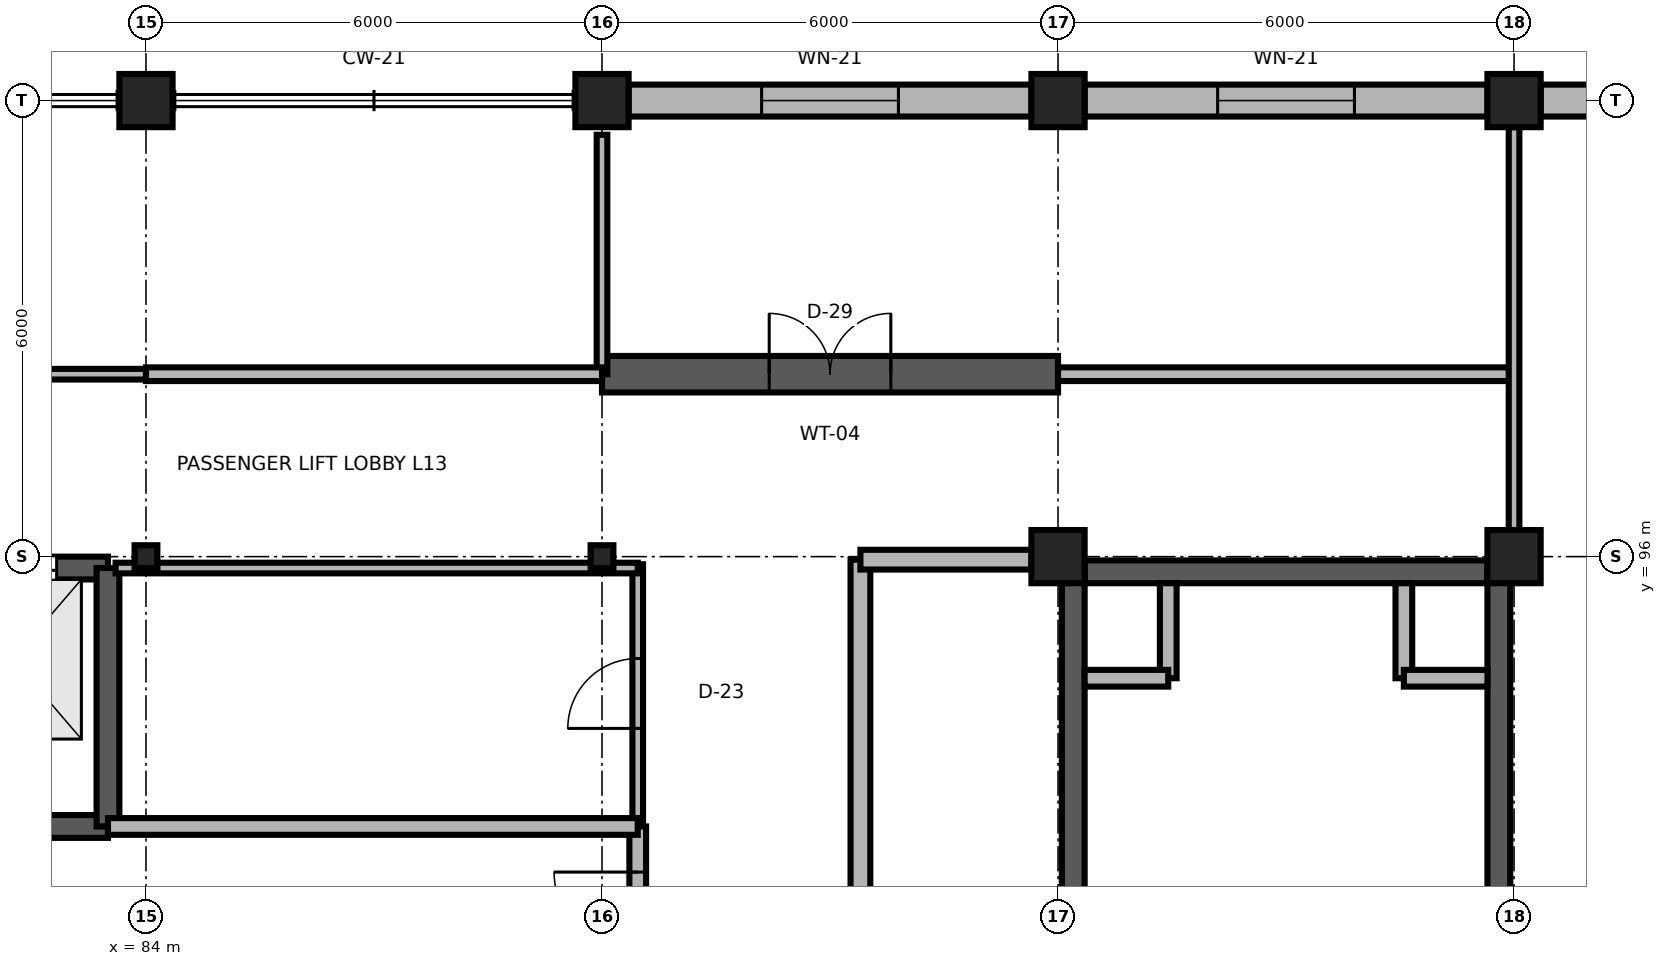
"""IFC4 building model, lengths in metres.
Left out: names, types, materials, properties, quantities, classifications, styles, units other than length and angle.
Written with IfcOpenShell. Run it as: python <this file> out.ifc"""

import sys

from ifc_helpers import new_model, si_unit, direction, frame, frame_2d, origin, origin_2d, place, context, subcontext, project, spatial, rectangle, i_section, extrude, element, fill, save


model = new_model("IFC4")
c1 = context("Model", 3, precision=1e-05, world=origin(), true_north=direction((0.0, 1.0)))
c2 = subcontext(c1, "Body", "Model", "MODEL_VIEW")
j1 = project(units=[si_unit("LENGTHUNIT", "METRE"), si_unit("PLANEANGLEUNIT", "RADIAN")], contexts=[c1])
p1 = place(None, origin())
s1 = spatial("IfcSite", under=j1, at=p1, CompositionType="ELEMENT")
p2 = place(p1, origin())
s2 = spatial("IfcBuilding", under=s1, at=p2, CompositionType="ELEMENT")
p3 = place(p2, frame((0.0, 0.0, 52.2)))
s3 = spatial("IfcBuildingStorey", under=s2, at=p3, CompositionType="ELEMENT", Elevation=52.2)
for number, where, z_axis, x_axis in (
    (1, (84.0, 96.0, 0.0), (0.0, 0.0, 1.0), (1.0, 0.0, 0.0)),
    (2, (90.0, 96.0, 0.0), (0.0, 0.0, 1.0), (1.0, 0.0, 0.0)),
):
    element("IfcColumn", number, at=place(p3, frame(where, z_axis=z_axis, x_axis=x_axis)), inside=s3, PredefinedType="COLUMN", context=c2, shape_type="SweptSolid", body=[
        extrude(i_section(OverallWidth=0.3, OverallDepth=0.3, WebThickness=0.01, FlangeThickness=0.015, FilletRadius=0.018, at=origin_2d()), origin(), (0.0, 0.0, 1.0), 3.9),
    ])
for number, where, z_axis, x_axis in (
    (3, (96.0, 96.0, 0.0), (0.0, 0.0, 1.0), (1.0, 0.0, 0.0)),
    (4, (102.0, 96.0, 0.0), (0.0, 0.0, 1.0), (1.0, 0.0, 0.0)),
    (5, (84.0, 102.0, 0.0), (0.0, 0.0, 1.0), (1.0, 0.0, 0.0)),
    (6, (90.0, 102.0, 0.0), (0.0, 0.0, 1.0), (1.0, 0.0, 0.0)),
    (7, (96.0, 102.0, 0.0), (0.0, 0.0, 1.0), (1.0, 0.0, 0.0)),
    (8, (102.0, 102.0, 0.0), (0.0, 0.0, 1.0), (1.0, 0.0, 0.0)),
):
    element("IfcColumn", number, at=place(p3, frame(where, z_axis=z_axis, x_axis=x_axis)), inside=s3, PredefinedType="COLUMN", context=c2, shape_type="SweptSolid", body=[
        extrude(rectangle(XDim=0.7, YDim=0.7, at=origin_2d()), origin(), (0.0, 0.0, 1.0), 3.9),
    ])
p4 = place(p3, frame((90.35, 102.0, 0.0), z_axis=(0.0, 0.0, 1.0), x_axis=(1.0, 0.0, 0.0)))
e9 = element("IfcWall", 9, at=p4, inside=s3, PredefinedType="SOLIDWALL", context=c2, shape_type="SweptSolid", body=[
    extrude(rectangle(XDim=5.3, YDim=0.42, at=frame_2d((2.65, 0.0))), origin(), (0.0, 0.0, 1.0), 3.32),
])
p5 = place(p4, frame((1.75, 0.0, 0.85)))
e10 = element("IfcOpeningElement", 10, at=p5, cuts=e9, PredefinedType="OPENING", context=c2, shape_type="SweptSolid", body=[
    extrude(rectangle(XDim=1.8, YDim=1.95, at=frame_2d((0.9, 0.975))), frame((0.0, 0.225, 0.0), z_axis=(0.0, -1.0, 0.0), x_axis=(1.0, 0.0, 0.0)), (0.0, 0.0, 1.0), 0.45),
])
p6 = place(p3, frame((96.35, 102.0, 0.0), z_axis=(0.0, 0.0, 1.0), x_axis=(1.0, 0.0, 0.0)))
e11 = element("IfcWall", 11, at=p6, inside=s3, PredefinedType="SOLIDWALL", context=c2, shape_type="SweptSolid", body=[
    extrude(rectangle(XDim=5.3, YDim=0.42, at=frame_2d((2.65, 0.0))), origin(), (0.0, 0.0, 1.0), 3.32),
])
p7 = place(p6, frame((1.75, 0.0, 0.85)))
e12 = element("IfcOpeningElement", 12, at=p7, cuts=e11, PredefinedType="OPENING", context=c2, shape_type="SweptSolid", body=[
    extrude(rectangle(XDim=1.8, YDim=1.95, at=frame_2d((0.9, 0.975))), frame((0.0, 0.225, 0.0), z_axis=(0.0, -1.0, 0.0), x_axis=(1.0, 0.0, 0.0)), (0.0, 0.0, 1.0), 0.45),
])
p8 = place(p3, frame((102.35, 102.0, 0.0), z_axis=(0.0, 0.0, 1.0), x_axis=(1.0, 0.0, 0.0)))
e13 = element("IfcWall", 13, at=p8, inside=s3, PredefinedType="SOLIDWALL", context=c2, shape_type="SweptSolid", body=[
    extrude(rectangle(XDim=5.3, YDim=0.42, at=frame_2d((2.65, 0.0))), origin(), (0.0, 0.0, 1.0), 3.32),
])
p9 = place(p8, frame((1.75, 0.0, 0.85)))
e14 = element("IfcOpeningElement", 14, at=p9, cuts=e13, PredefinedType="OPENING", context=c2, shape_type="SweptSolid", body=[
    extrude(rectangle(XDim=1.8, YDim=1.95, at=frame_2d((0.9, 0.975))), frame((0.0, 0.225, 0.0), z_axis=(0.0, -1.0, 0.0), x_axis=(1.0, 0.0, 0.0)), (0.0, 0.0, 1.0), 0.45),
])
p10 = place(p3, frame((96.35, 95.8, 0.0), z_axis=(0.0, 0.0, 1.0), x_axis=(1.0, 0.0, 0.0)))
e15 = element("IfcWall", 15, at=p10, inside=s3, PredefinedType="SHEAR", context=c2, shape_type="SweptSolid", body=[
    extrude(rectangle(XDim=5.3, YDim=0.3, at=frame_2d((2.65, 0.0))), origin(), (0.0, 0.0, 1.0), 3.74),
])
for number, where, z_axis, x_axis in (
    (16, (96.2, 84.0, 0.0), (0.0, 0.0, 1.0), (0.0, 1.0, 0.0)),
    (17, (101.8, 84.0, 0.0), (0.0, 0.0, 1.0), (0.0, 1.0, 0.0)),
):
    element("IfcWall", number, at=place(p3, frame(where, z_axis=z_axis, x_axis=x_axis)), inside=s3, PredefinedType="SHEAR", context=c2, shape_type="SweptSolid", body=[
        extrude(rectangle(XDim=11.8, YDim=0.3, at=frame_2d((5.9, 0.0))), origin(), (0.0, 0.0, 1.0), 3.74),
    ])
p11 = place(p3, frame((97.45, 94.4, 0.0), z_axis=(0.0, 0.0, 1.0), x_axis=(0.0, 1.0, 0.0)))
e18 = element("IfcWall", 18, at=p11, inside=s3, PredefinedType="PARTITIONING", context=c2, shape_type="SweptSolid", body=[
    extrude(rectangle(XDim=1.25, YDim=0.22, at=frame_2d((0.625, 0.0))), origin(), (0.0, 0.0, 1.0), 3.74),
])
p12 = place(p3, frame((96.35, 94.4, 0.0), z_axis=(0.0, 0.0, 1.0), x_axis=(1.0, 0.0, 0.0)))
e19 = element("IfcWall", 19, at=p12, inside=s3, PredefinedType="PARTITIONING", context=c2, shape_type="SweptSolid", body=[
    extrude(rectangle(XDim=1.1, YDim=0.22, at=frame_2d((0.55, 0.0))), origin(), (0.0, 0.0, 1.0), 3.74),
])
p13 = place(p3, frame((100.55, 94.4, 0.0), z_axis=(0.0, 0.0, 1.0), x_axis=(0.0, 1.0, 0.0)))
e20 = element("IfcWall", 20, at=p13, inside=s3, PredefinedType="PARTITIONING", context=c2, shape_type="SweptSolid", body=[
    extrude(rectangle(XDim=1.25, YDim=0.22, at=frame_2d((0.625, 0.0))), origin(), (0.0, 0.0, 1.0), 3.74),
])
p14 = place(p3, frame((100.55, 94.4, 0.0), z_axis=(0.0, 0.0, 1.0), x_axis=(1.0, 0.0, 0.0)))
e21 = element("IfcWall", 21, at=p14, inside=s3, PredefinedType="PARTITIONING", context=c2, shape_type="SweptSolid", body=[
    extrude(rectangle(XDim=1.1, YDim=0.22, at=frame_2d((0.55, 0.0))), origin(), (0.0, 0.0, 1.0), 3.74),
])
p15 = place(p3, frame((81.0, 95.85, 0.0), z_axis=(0.0, 0.0, 1.0), x_axis=(1.0, 0.0, 0.0)))
e22 = element("IfcWall", 22, at=p15, inside=s3, PredefinedType="SHEAR", context=c2, shape_type="SweptSolid", body=[
    extrude(rectangle(XDim=2.5, YDim=0.3, at=frame_2d((1.25, 0.0))), origin(), (0.0, 0.0, 1.0), 3.74),
])
p16 = place(p15, frame((0.675, 0.0, 0.0)))
e23 = element("IfcOpeningElement", 23, at=p16, cuts=e22, PredefinedType="OPENING", context=c2, shape_type="SweptSolid", body=[
    extrude(rectangle(XDim=1.15, YDim=2.15, at=frame_2d((0.575, 1.075))), frame((0.0, 0.165, 0.0), z_axis=(0.0, -1.0, 0.0), x_axis=(1.0, 0.0, 0.0)), (0.0, 0.0, 1.0), 0.33),
])
p17 = place(p3, frame((81.0, 92.45, 0.0), z_axis=(0.0, 0.0, 1.0), x_axis=(1.0, 0.0, 0.0)))
e24 = element("IfcWall", 24, at=p17, inside=s3, PredefinedType="SHEAR", context=c2, shape_type="SweptSolid", body=[
    extrude(rectangle(XDim=2.5, YDim=0.3, at=frame_2d((1.25, 0.0))), origin(), (0.0, 0.0, 1.0), 3.74),
])
p18 = place(p3, frame((83.5, 92.45, 0.0), z_axis=(0.0, 0.0, 1.0), x_axis=(0.0, 1.0, 0.0)))
e25 = element("IfcWall", 25, at=p18, inside=s3, PredefinedType="SHEAR", context=c2, shape_type="SweptSolid", body=[
    extrude(rectangle(XDim=3.4, YDim=0.3, at=frame_2d((1.7, 0.0))), origin(), (0.0, 0.0, 1.0), 3.74),
])
p19 = place(p3, frame((93.4, 84.0, 0.0), z_axis=(0.0, 0.0, 1.0), x_axis=(0.0, 1.0, 0.0)))
e26 = element("IfcWall", 26, at=p19, inside=s3, PredefinedType="PARTITIONING", context=c2, shape_type="SweptSolid", body=[
    extrude(rectangle(XDim=11.96, YDim=0.26, at=frame_2d((5.98, 0.0))), origin(), (0.0, 0.0, 1.0), 3.74),
])
p20 = place(p19, frame((3.425, 0.0, 0.0)))
e27 = element("IfcOpeningElement", 27, at=p20, cuts=e26, PredefinedType="OPENING", context=c2, shape_type="SweptSolid", body=[
    extrude(rectangle(XDim=1.15, YDim=2.2, at=frame_2d((0.575, 1.1))), frame((0.0, 0.145, 0.0), z_axis=(0.0, -1.0, 0.0), x_axis=(1.0, 0.0, 0.0)), (0.0, 0.0, 1.0), 0.29),
])
p21 = place(p3, frame((93.4, 95.96, 0.0), z_axis=(0.0, 0.0, 1.0), x_axis=(1.0, 0.0, 0.0)))
e28 = element("IfcWall", 28, at=p21, inside=s3, PredefinedType="PARTITIONING", context=c2, shape_type="SweptSolid", body=[
    extrude(rectangle(XDim=2.25, YDim=0.26, at=frame_2d((1.125, 0.0))), origin(), (0.0, 0.0, 1.0), 3.449),
])
p22 = place(p3, frame((90.47, 89.2, 0.0), z_axis=(0.0, 0.0, 1.0), x_axis=(0.0, 1.0, 0.0)))
e29 = element("IfcWall", 29, at=p22, inside=s3, PredefinedType="PARTITIONING", context=c2, shape_type="SweptSolid", body=[
    extrude(rectangle(XDim=3.25, YDim=0.22, at=frame_2d((1.625, 0.0))), origin(), (0.0, 0.0, 1.0), 3.74),
])
p23 = place(p22, frame((1.55, 0.0, 0.0)))
e30 = element("IfcOpeningElement", 30, at=p23, cuts=e29, PredefinedType="OPENING", context=c2, shape_type="SweptSolid", body=[
    extrude(rectangle(XDim=1.1, YDim=2.15, at=frame_2d((0.55, 1.075))), frame((0.0, 0.125, 0.0), z_axis=(0.0, -1.0, 0.0), x_axis=(1.0, 0.0, 0.0)), (0.0, 0.0, 1.0), 0.25),
])
p24 = place(p3, frame((72.0, 98.4, 0.0), z_axis=(0.0, 0.0, 1.0), x_axis=(1.0, 0.0, 0.0)))
e31 = element("IfcWall", 31, at=p24, inside=s3, PredefinedType="PARTITIONING", context=c2, shape_type="SweptSolid", body=[
    extrude(rectangle(XDim=12.0, YDim=0.14, at=frame_2d((6.0, 0.0))), origin(), (0.0, 0.0, 1.0), 3.74),
])
p25 = place(p24, frame((5.175, 0.0, 0.0)))
e32 = element("IfcOpeningElement", 32, at=p25, cuts=e31, PredefinedType="OPENING", context=c2, shape_type="SweptSolid", body=[
    extrude(rectangle(XDim=1.65, YDim=2.35, at=frame_2d((0.825, 1.175))), frame((0.0, 0.085, 0.0), z_axis=(0.0, -1.0, 0.0), x_axis=(1.0, 0.0, 0.0)), (0.0, 0.0, 1.0), 0.17),
])
p26 = place(p3, frame((90.0, 98.4, 0.0), z_axis=(0.0, 0.0, 1.0), x_axis=(1.0, 0.0, 0.0)))
e33 = element("IfcWall", 33, at=p26, inside=s3, PredefinedType="SHEAR", context=c2, shape_type="SweptSolid", body=[
    extrude(rectangle(XDim=6.0, YDim=0.48, at=frame_2d((3.0, 0.0))), origin(), (0.0, 0.0, 1.0), 3.74),
])
p27 = place(p26, frame((2.2, 0.0, 0.0)))
e34 = element("IfcOpeningElement", 34, at=p27, cuts=e33, PredefinedType="OPENING", context=c2, shape_type="SweptSolid", body=[
    extrude(rectangle(XDim=1.6, YDim=2.25, at=frame_2d((0.8, 1.125))), frame((0.0, 0.255, 0.0), z_axis=(0.0, -1.0, 0.0), x_axis=(1.0, 0.0, 0.0)), (0.0, 0.0, 1.0), 0.51),
])
p28 = place(p3, frame((90.47, 92.5, 0.0), z_axis=(0.0, 0.0, 1.0), x_axis=(0.0, 1.0, 0.0)))
e35 = element("IfcWall", 35, at=p28, inside=s3, PredefinedType="PARTITIONING", context=c2, shape_type="SweptSolid", body=[
    extrude(rectangle(XDim=3.4, YDim=0.14, at=frame_2d((1.7, 0.0))), origin(), (0.0, 0.0, 1.0), 3.74),
])
p29 = place(p28, frame((1.24, 0.0, 0.0)))
e36 = element("IfcOpeningElement", 36, at=p29, cuts=e35, PredefinedType="OPENING", context=c2, shape_type="SweptSolid", body=[
    extrude(rectangle(XDim=0.92, YDim=2.15, at=frame_2d((0.46, 1.075))), frame((0.0, 0.085, 0.0), z_axis=(0.0, -1.0, 0.0), x_axis=(1.0, 0.0, 0.0)), (0.0, 0.0, 1.0), 0.17),
])
p30 = place(p3, frame((90.0, 98.4, 0.0), z_axis=(0.0, 0.0, 1.0), x_axis=(0.0, 1.0, 0.0)))
e37 = element("IfcWall", 37, at=p30, inside=s3, PredefinedType="PARTITIONING", context=c2, shape_type="SweptSolid", body=[
    extrude(rectangle(XDim=3.15, YDim=0.14, at=frame_2d((1.575, 0.0))), origin(), (0.0, 0.0, 1.0), 3.449),
])
p31 = place(p3, frame((83.6, 95.85, 0.0), z_axis=(0.0, 0.0, 1.0), x_axis=(1.0, 0.0, 0.0)))
e38 = element("IfcWall", 38, at=p31, inside=s3, PredefinedType="PARTITIONING", context=c2, shape_type="SweptSolid", body=[
    extrude(rectangle(XDim=6.87, YDim=0.14, at=frame_2d((3.435, 0.0))), origin(), (0.0, 0.0, 1.0), 3.74),
])
p32 = place(p3, frame((83.5, 92.45, 0.0), z_axis=(0.0, 0.0, 1.0), x_axis=(1.0, 0.0, 0.0)))
e39 = element("IfcWall", 39, at=p32, inside=s3, PredefinedType="PARTITIONING", context=c2, shape_type="SweptSolid", body=[
    extrude(rectangle(XDim=6.97, YDim=0.22, at=frame_2d((3.485, 0.0))), origin(), (0.0, 0.0, 1.0), 3.74),
])
for number, where, z_axis, x_axis in (
    (40, (84.0, 98.4, 0.0), (0.0, 0.0, 1.0), (1.0, 0.0, 0.0)),
    (41, (96.0, 98.4, 0.0), (0.0, 0.0, 1.0), (1.0, 0.0, 0.0)),
):
    element("IfcWall", number, at=place(p3, frame(where, z_axis=z_axis, x_axis=x_axis)), inside=s3, PredefinedType="PARTITIONING", context=c2, shape_type="SweptSolid", body=[
        extrude(rectangle(XDim=6.0, YDim=0.18, at=frame_2d((3.0, 0.0))), origin(), (0.0, 0.0, 1.0), 3.74),
    ])
p33 = place(p3, frame((102.0, 96.35, 0.0), z_axis=(0.0, 0.0, 1.0), x_axis=(0.0, 1.0, 0.0)))
e42 = element("IfcWall", 42, at=p33, inside=s3, PredefinedType="PARTITIONING", context=c2, shape_type="SweptSolid", body=[
    extrude(rectangle(XDim=5.3, YDim=0.14, at=frame_2d((2.65, 0.0))), origin(), (0.0, 0.0, 1.0), 3.449),
])
p34 = place(p5, origin())
e43 = element("IfcWindow", 43, at=p34, inside=s3, PartitioningType="SINGLE_PANEL", PredefinedType="WINDOW", context=c2, shape_type="SweptSolid", body=[
    extrude(rectangle(XDim=1.8, YDim=1.95, at=frame_2d((0.9, 0.975))), frame((0.0, 0.03, 0.0), z_axis=(0.0, -1.0, 0.0), x_axis=(1.0, 0.0, 0.0)), (0.0, 0.0, 1.0), 0.06),
])
fill(e10, e43)
p35 = place(p7, origin())
e44 = element("IfcWindow", 44, at=p35, inside=s3, PartitioningType="SINGLE_PANEL", PredefinedType="WINDOW", context=c2, shape_type="SweptSolid", body=[
    extrude(rectangle(XDim=1.8, YDim=1.95, at=frame_2d((0.9, 0.975))), frame((0.0, 0.03, 0.0), z_axis=(0.0, -1.0, 0.0), x_axis=(1.0, 0.0, 0.0)), (0.0, 0.0, 1.0), 0.06),
])
fill(e12, e44)
p36 = place(p16, origin())
e45 = element("IfcDoor", 45, at=p36, inside=s3, OperationType="DOUBLE_DOOR_SLIDING", PredefinedType="DOOR", context=c2, shape_type="SweptSolid", body=[
    extrude(rectangle(XDim=1.15, YDim=2.15, at=frame_2d((0.575, 1.075))), frame((0.0, 0.025, 0.0), z_axis=(0.0, -1.0, 0.0), x_axis=(1.0, 0.0, 0.0)), (0.0, 0.0, 1.0), 0.05),
])
fill(e23, e45)
p37 = place(p23, origin())
e46 = element("IfcDoor", 46, at=p37, inside=s3, OperationType="SINGLE_SWING_RIGHT", PredefinedType="DOOR", context=c2, shape_type="SweptSolid", body=[
    extrude(rectangle(XDim=1.1, YDim=2.15, at=frame_2d((0.55, 1.075))), frame((0.0, 0.025, 0.0), z_axis=(0.0, -1.0, 0.0), x_axis=(1.0, 0.0, 0.0)), (0.0, 0.0, 1.0), 0.05),
])
fill(e30, e46)
p38 = place(p27, origin())
e47 = element("IfcDoor", 47, at=p38, inside=s3, OperationType="DOUBLE_DOOR_SINGLE_SWING", PredefinedType="DOOR", context=c2, shape_type="SweptSolid", body=[
    extrude(rectangle(XDim=1.6, YDim=2.25, at=frame_2d((0.8, 1.125))), frame((0.0, 0.025, 0.0), z_axis=(0.0, -1.0, 0.0), x_axis=(1.0, 0.0, 0.0)), (0.0, 0.0, 1.0), 0.05),
])
fill(e34, e47)
p39 = place(p29, origin())
e48 = element("IfcDoor", 48, at=p39, inside=s3, OperationType="SINGLE_SWING_LEFT", PredefinedType="DOOR", context=c2, shape_type="SweptSolid", body=[
    extrude(rectangle(XDim=0.92, YDim=2.15, at=frame_2d((0.46, 1.075))), frame((0.0, 0.025, 0.0), z_axis=(0.0, -1.0, 0.0), x_axis=(1.0, 0.0, 0.0)), (0.0, 0.0, 1.0), 0.05),
])
fill(e36, e48)
save(model, sys.argv[1])
